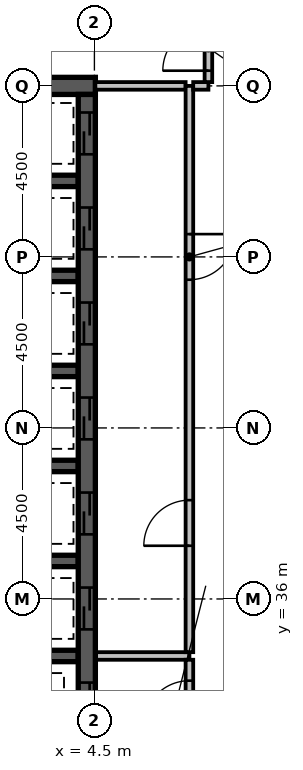
"""IFC4 building model, lengths in metres.
Left out: names, types, materials, properties, quantities, classifications, styles, units other than length and angle.
Written with IfcOpenShell. Run it as: python <this file> out.ifc"""

import sys

from ifc_helpers import new_model, si_unit, direction, frame, frame_2d, origin, place, context, subcontext, project, spatial, rectangle, extrude, element, fill, save


model = new_model("IFC4")
c1 = context("Model", 3, precision=1e-05, world=origin(), true_north=direction((0.0, 1.0)))
c2 = subcontext(c1, "Body", "Model", "MODEL_VIEW")
j1 = project(units=[si_unit("LENGTHUNIT", "METRE"), si_unit("PLANEANGLEUNIT", "RADIAN")], contexts=[c1])
p1 = place(None, origin())
s1 = spatial("IfcSite", under=j1, at=p1, CompositionType="ELEMENT")
p2 = place(p1, origin())
s2 = spatial("IfcBuilding", under=s1, at=p2, CompositionType="ELEMENT")
p3 = place(p2, frame((0.0, 0.0, 240.2)))
s3 = spatial("IfcBuildingStorey", under=s2, at=p3, CompositionType="ELEMENT", Elevation=240.2)
p4 = place(p3, frame((0.275, 49.5, -0.3), z_axis=(0.0, 0.0, 1.0), x_axis=(1.0, 0.0, 0.0)))
e1 = element("IfcWall", 1, at=p4, inside=s3, PredefinedType="SHEAR", context=c2, shape_type="SweptSolid", body=[
    extrude(rectangle(XDim=4.25, YDim=0.45, at=frame_2d((2.125, 0.0))), origin(), (0.0, 0.0, 1.0), 3.6),
])
for number, where, z_axis, x_axis in (
    (2, (0.725, 34.5, -0.3), (0.0, 0.0, 1.0), (1.0, 0.0, 0.0)),
    (3, (0.725, 37.0, -0.3), (0.0, 0.0, 1.0), (1.0, 0.0, 0.0)),
    (4, (0.725, 39.5, -0.3), (0.0, 0.0, 1.0), (1.0, 0.0, 0.0)),
    (5, (0.725, 42.0, -0.3), (0.0, 0.0, 1.0), (1.0, 0.0, 0.0)),
    (6, (0.725, 44.5, -0.3), (0.0, 0.0, 1.0), (1.0, 0.0, 0.0)),
    (7, (0.725, 47.0, -0.3), (0.0, 0.0, 1.0), (1.0, 0.0, 0.0)),
):
    element("IfcWall", number, at=place(p3, frame(where, z_axis=z_axis, x_axis=x_axis)), inside=s3, PredefinedType="SHEAR", context=c2, shape_type="SweptSolid", body=[
        extrude(rectangle(XDim=3.35, YDim=0.3, at=frame_2d((1.675, 0.0))), origin(), (0.0, 0.0, 1.0), 3.6),
    ])
p5 = place(p3, frame((4.3, 27.15, -0.3), z_axis=(0.0, 0.0, 1.0), x_axis=(0.0, 1.0, 0.0)))
e8 = element("IfcWall", 8, at=p5, inside=s3, PredefinedType="SHEAR", context=c2, shape_type="SweptSolid", body=[
    extrude(rectangle(XDim=22.125, YDim=0.45, at=frame_2d((11.062, 0.0))), origin(), (0.0, 0.0, 1.0), 3.6),
])
p6 = place(p5, frame((3.05, 0.0, 0.3)))
e9 = element("IfcOpeningElement", 9, at=p6, cuts=e8, PredefinedType="OPENING", context=c2, shape_type="SweptSolid", body=[
    extrude(rectangle(XDim=1.1, YDim=2.1, at=frame_2d((0.55, 1.05))), frame((0.0, 0.237, 0.0), z_axis=(0.0, -1.0, 0.0), x_axis=(1.0, 0.0, 0.0)), (0.0, 0.0, 1.0), 0.474),
])
p7 = place(p5, frame((0.55, 0.0, 0.3)))
e10 = element("IfcOpeningElement", 10, at=p7, cuts=e8, PredefinedType="OPENING", context=c2, shape_type="SweptSolid", body=[
    extrude(rectangle(XDim=1.1, YDim=2.1, at=frame_2d((0.55, 1.05))), frame((0.0, 0.237, 0.0), z_axis=(0.0, -1.0, 0.0), x_axis=(1.0, 0.0, 0.0)), (0.0, 0.0, 1.0), 0.474),
])
p8 = place(p5, frame((20.55, 0.0, 0.3)))
e11 = element("IfcOpeningElement", 11, at=p8, cuts=e8, PredefinedType="OPENING", context=c2, shape_type="SweptSolid", body=[
    extrude(rectangle(XDim=1.1, YDim=2.1, at=frame_2d((0.55, 1.05))), frame((0.0, 0.237, 0.0), z_axis=(0.0, -1.0, 0.0), x_axis=(1.0, 0.0, 0.0)), (0.0, 0.0, 1.0), 0.474),
])
p9 = place(p5, frame((18.05, 0.0, 0.3)))
e12 = element("IfcOpeningElement", 12, at=p9, cuts=e8, PredefinedType="OPENING", context=c2, shape_type="SweptSolid", body=[
    extrude(rectangle(XDim=1.1, YDim=2.1, at=frame_2d((0.55, 1.05))), frame((0.0, 0.237, 0.0), z_axis=(0.0, -1.0, 0.0), x_axis=(1.0, 0.0, 0.0)), (0.0, 0.0, 1.0), 0.474),
])
p10 = place(p5, frame((15.55, 0.0, 0.3)))
e13 = element("IfcOpeningElement", 13, at=p10, cuts=e8, PredefinedType="OPENING", context=c2, shape_type="SweptSolid", body=[
    extrude(rectangle(XDim=1.1, YDim=2.1, at=frame_2d((0.55, 1.05))), frame((0.0, 0.237, 0.0), z_axis=(0.0, -1.0, 0.0), x_axis=(1.0, 0.0, 0.0)), (0.0, 0.0, 1.0), 0.474),
])
p11 = place(p5, frame((13.05, 0.0, 0.3)))
e14 = element("IfcOpeningElement", 14, at=p11, cuts=e8, PredefinedType="OPENING", context=c2, shape_type="SweptSolid", body=[
    extrude(rectangle(XDim=1.1, YDim=2.1, at=frame_2d((0.55, 1.05))), frame((0.0, 0.237, 0.0), z_axis=(0.0, -1.0, 0.0), x_axis=(1.0, 0.0, 0.0)), (0.0, 0.0, 1.0), 0.474),
])
p12 = place(p5, frame((10.55, 0.0, 0.3)))
e15 = element("IfcOpeningElement", 15, at=p12, cuts=e8, PredefinedType="OPENING", context=c2, shape_type="SweptSolid", body=[
    extrude(rectangle(XDim=1.1, YDim=2.1, at=frame_2d((0.55, 1.05))), frame((0.0, 0.237, 0.0), z_axis=(0.0, -1.0, 0.0), x_axis=(1.0, 0.0, 0.0)), (0.0, 0.0, 1.0), 0.474),
])
p13 = place(p5, frame((8.05, 0.0, 0.3)))
e16 = element("IfcOpeningElement", 16, at=p13, cuts=e8, PredefinedType="OPENING", context=c2, shape_type="SweptSolid", body=[
    extrude(rectangle(XDim=1.1, YDim=2.1, at=frame_2d((0.55, 1.05))), frame((0.0, 0.237, 0.0), z_axis=(0.0, -1.0, 0.0), x_axis=(1.0, 0.0, 0.0)), (0.0, 0.0, 1.0), 0.474),
])
p14 = place(p5, frame((5.55, 0.0, 0.3)))
e17 = element("IfcOpeningElement", 17, at=p14, cuts=e8, PredefinedType="OPENING", context=c2, shape_type="SweptSolid", body=[
    extrude(rectangle(XDim=1.1, YDim=2.1, at=frame_2d((0.55, 1.05))), frame((0.0, 0.237, 0.0), z_axis=(0.0, -1.0, 0.0), x_axis=(1.0, 0.0, 0.0)), (0.0, 0.0, 1.0), 0.474),
])
p15 = place(p3, frame((4.545, 34.5, 0.0), z_axis=(0.0, 0.0, 1.0), x_axis=(1.0, 0.0, 0.0)))
e18 = element("IfcWall", 18, at=p15, inside=s3, PredefinedType="PARTITIONING", context=c2, shape_type="SweptSolid", body=[
    extrude(rectangle(XDim=2.455, YDim=0.2, at=frame_2d((1.228, 0.0))), origin(), (0.0, 0.0, 1.0), 3.3),
])
p16 = place(p3, frame((7.0, 34.6, 0.0), z_axis=(0.0, 0.0, 1.0), x_axis=(0.0, 1.0, 0.0)))
e19 = element("IfcWall", 19, at=p16, inside=s3, PredefinedType="PARTITIONING", context=c2, shape_type="SweptSolid", body=[
    extrude(rectangle(XDim=14.9, YDim=0.2, at=frame_2d((7.45, 0.0))), origin(), (0.0, 0.0, 1.0), 3.3),
])
p17 = place(p16, frame((2.8, 0.0, 0.0)))
e20 = element("IfcOpeningElement", 20, at=p17, cuts=e19, PredefinedType="OPENING", context=c2, shape_type="SweptSolid", body=[
    extrude(rectangle(XDim=1.2, YDim=2.1, at=frame_2d((0.6, 1.05))), frame((0.0, 0.112, 0.0), z_axis=(0.0, -1.0, 0.0), x_axis=(1.0, 0.0, 0.0)), (0.0, 0.0, 1.0), 0.224),
])
p18 = place(p16, frame((9.8, 0.0, 0.0)))
e21 = element("IfcOpeningElement", 21, at=p18, cuts=e19, PredefinedType="OPENING", context=c2, shape_type="SweptSolid", body=[
    extrude(rectangle(XDim=1.2, YDim=2.1, at=frame_2d((0.6, 1.05))), frame((0.0, 0.112, 0.0), z_axis=(0.0, -1.0, 0.0), x_axis=(1.0, 0.0, 0.0)), (0.0, 0.0, 1.0), 0.224),
])
p19 = place(p3, frame((4.525, 49.5, 0.0), z_axis=(0.0, 0.0, 1.0), x_axis=(1.0, 0.0, 0.0)))
e22 = element("IfcWall", 22, at=p19, inside=s3, PredefinedType="PARTITIONING", context=c2, shape_type="SweptSolid", body=[
    extrude(rectangle(XDim=2.375, YDim=0.2, at=frame_2d((1.188, 0.0))), origin(), (0.0, 0.0, 1.0), 3.3),
])
p20 = place(p3, frame((7.0, 32.1, 0.0), z_axis=(0.0, 0.0, 1.0), x_axis=(0.0, 1.0, 0.0)))
e23 = element("IfcWall", 23, at=p20, inside=s3, PredefinedType="PARTITIONING", context=c2, shape_type="SweptSolid", body=[
    extrude(rectangle(XDim=2.3, YDim=0.2, at=frame_2d((1.15, 0.0))), origin(), (0.0, 0.0, 1.0), 3.3),
])
p21 = place(p20, frame((0.55, 0.0, 0.0)))
e24 = element("IfcOpeningElement", 24, at=p21, cuts=e23, PredefinedType="OPENING", context=c2, shape_type="SweptSolid", body=[
    extrude(rectangle(XDim=1.2, YDim=2.1, at=frame_2d((0.6, 1.05))), frame((0.0, 0.112, 0.0), z_axis=(0.0, -1.0, 0.0), x_axis=(1.0, 0.0, 0.0)), (0.0, 0.0, 1.0), 0.224),
])
p22 = place(p3, frame((7.1, 49.5, 0.0), z_axis=(0.0, 0.0, 1.0), x_axis=(1.0, 0.0, 0.0)))
e25 = element("IfcWall", 25, at=p22, inside=s3, PredefinedType="PARTITIONING", context=c2, shape_type="SweptSolid", body=[
    extrude(rectangle(XDim=0.4, YDim=0.2, at=frame_2d((0.2, 0.0))), origin(), (0.0, 0.0, 1.0), 3.3),
])
p23 = place(p3, frame((7.5, 49.6, 0.0), z_axis=(0.0, 0.0, 1.0), x_axis=(0.0, 1.0, 0.0)))
e26 = element("IfcWall", 26, at=p23, inside=s3, PredefinedType="PARTITIONING", context=c2, shape_type="SweptSolid", body=[
    extrude(rectangle(XDim=3.9, YDim=0.2, at=frame_2d((1.95, 0.0))), origin(), (0.0, 0.0, 1.0), 3.3),
])
p24 = place(p23, frame((0.3, 0.0, 0.0)))
e27 = element("IfcOpeningElement", 27, at=p24, cuts=e26, PredefinedType="OPENING", context=c2, shape_type="SweptSolid", body=[
    extrude(rectangle(XDim=1.2, YDim=2.1, at=frame_2d((0.6, 1.05))), frame((0.0, 0.112, 0.0), z_axis=(0.0, -1.0, 0.0), x_axis=(1.0, 0.0, 0.0)), (0.0, 0.0, 1.0), 0.224),
])
p25 = place(p24, origin())
e28 = element("IfcDoor", 28, at=p25, inside=s3, OperationType="SINGLE_SWING_LEFT", PredefinedType="DOOR", context=c2, shape_type="SweptSolid", body=[
    extrude(rectangle(XDim=1.2, YDim=2.1, at=frame_2d((0.6, 1.05))), frame((0.0, 0.025, 0.0), z_axis=(0.0, -1.0, 0.0), x_axis=(1.0, 0.0, 0.0)), (0.0, 0.0, 1.0), 0.05),
])
fill(e27, e28)
p26 = place(p8, origin())
e29 = element("IfcDoor", 29, at=p26, inside=s3, OperationType="SLIDING_TO_LEFT", PredefinedType="DOOR", context=c2, shape_type="SweptSolid", body=[
    extrude(rectangle(XDim=1.1, YDim=2.1, at=frame_2d((0.55, 1.05))), frame((0.0, 0.025, 0.0), z_axis=(0.0, -1.0, 0.0), x_axis=(1.0, 0.0, 0.0)), (0.0, 0.0, 1.0), 0.05),
])
fill(e11, e29)
p27 = place(p9, origin())
e30 = element("IfcDoor", 30, at=p27, inside=s3, OperationType="SLIDING_TO_LEFT", PredefinedType="DOOR", context=c2, shape_type="SweptSolid", body=[
    extrude(rectangle(XDim=1.1, YDim=2.1, at=frame_2d((0.55, 1.05))), frame((0.0, 0.025, 0.0), z_axis=(0.0, -1.0, 0.0), x_axis=(1.0, 0.0, 0.0)), (0.0, 0.0, 1.0), 0.05),
])
fill(e12, e30)
p28 = place(p10, origin())
e31 = element("IfcDoor", 31, at=p28, inside=s3, OperationType="SLIDING_TO_LEFT", PredefinedType="DOOR", context=c2, shape_type="SweptSolid", body=[
    extrude(rectangle(XDim=1.1, YDim=2.1, at=frame_2d((0.55, 1.05))), frame((0.0, 0.025, 0.0), z_axis=(0.0, -1.0, 0.0), x_axis=(1.0, 0.0, 0.0)), (0.0, 0.0, 1.0), 0.05),
])
fill(e13, e31)
p29 = place(p11, origin())
e32 = element("IfcDoor", 32, at=p29, inside=s3, OperationType="SLIDING_TO_LEFT", PredefinedType="DOOR", context=c2, shape_type="SweptSolid", body=[
    extrude(rectangle(XDim=1.1, YDim=2.1, at=frame_2d((0.55, 1.05))), frame((0.0, 0.025, 0.0), z_axis=(0.0, -1.0, 0.0), x_axis=(1.0, 0.0, 0.0)), (0.0, 0.0, 1.0), 0.05),
])
fill(e14, e32)
p30 = place(p12, origin())
e33 = element("IfcDoor", 33, at=p30, inside=s3, OperationType="SLIDING_TO_LEFT", PredefinedType="DOOR", context=c2, shape_type="SweptSolid", body=[
    extrude(rectangle(XDim=1.1, YDim=2.1, at=frame_2d((0.55, 1.05))), frame((0.0, 0.025, 0.0), z_axis=(0.0, -1.0, 0.0), x_axis=(1.0, 0.0, 0.0)), (0.0, 0.0, 1.0), 0.05),
])
fill(e15, e33)
p31 = place(p13, origin())
e34 = element("IfcDoor", 34, at=p31, inside=s3, OperationType="SLIDING_TO_LEFT", PredefinedType="DOOR", context=c2, shape_type="SweptSolid", body=[
    extrude(rectangle(XDim=1.1, YDim=2.1, at=frame_2d((0.55, 1.05))), frame((0.0, 0.025, 0.0), z_axis=(0.0, -1.0, 0.0), x_axis=(1.0, 0.0, 0.0)), (0.0, 0.0, 1.0), 0.05),
])
fill(e16, e34)
p32 = place(p17, origin())
e35 = element("IfcDoor", 35, at=p32, inside=s3, OperationType="SINGLE_SWING_LEFT", PredefinedType="DOOR", context=c2, shape_type="SweptSolid", body=[
    extrude(rectangle(XDim=1.2, YDim=2.1, at=frame_2d((0.6, 1.05))), frame((0.0, 0.025, 0.0), z_axis=(0.0, -1.0, 0.0), x_axis=(1.0, 0.0, 0.0)), (0.0, 0.0, 1.0), 0.05),
])
fill(e20, e35)
p33 = place(p18, origin())
e36 = element("IfcDoor", 36, at=p33, inside=s3, OperationType="SINGLE_SWING_RIGHT", PredefinedType="DOOR", context=c2, shape_type="SweptSolid", body=[
    extrude(rectangle(XDim=1.2, YDim=2.1, at=frame_2d((0.6, 1.05))), frame((0.0, 0.025, 0.0), z_axis=(0.0, -1.0, 0.0), x_axis=(1.0, 0.0, 0.0)), (0.0, 0.0, 1.0), 0.05),
])
fill(e21, e36)
p34 = place(p21, origin())
e37 = element("IfcDoor", 37, at=p34, inside=s3, OperationType="SINGLE_SWING_LEFT", PredefinedType="DOOR", context=c2, shape_type="SweptSolid", body=[
    extrude(rectangle(XDim=1.2, YDim=2.1, at=frame_2d((0.6, 1.05))), frame((0.0, 0.025, 0.0), z_axis=(0.0, -1.0, 0.0), x_axis=(1.0, 0.0, 0.0)), (0.0, 0.0, 1.0), 0.05),
])
fill(e24, e37)
p35 = place(p14, origin())
e38 = element("IfcDoor", 38, at=p35, inside=s3, OperationType="SLIDING_TO_LEFT", PredefinedType="DOOR", context=c2, shape_type="SweptSolid", body=[
    extrude(rectangle(XDim=1.1, YDim=2.1, at=frame_2d((0.55, 1.05))), frame((0.0, 0.025, 0.0), z_axis=(0.0, -1.0, 0.0), x_axis=(1.0, 0.0, 0.0)), (0.0, 0.0, 1.0), 0.05),
])
fill(e17, e38)
save(model, sys.argv[1])
